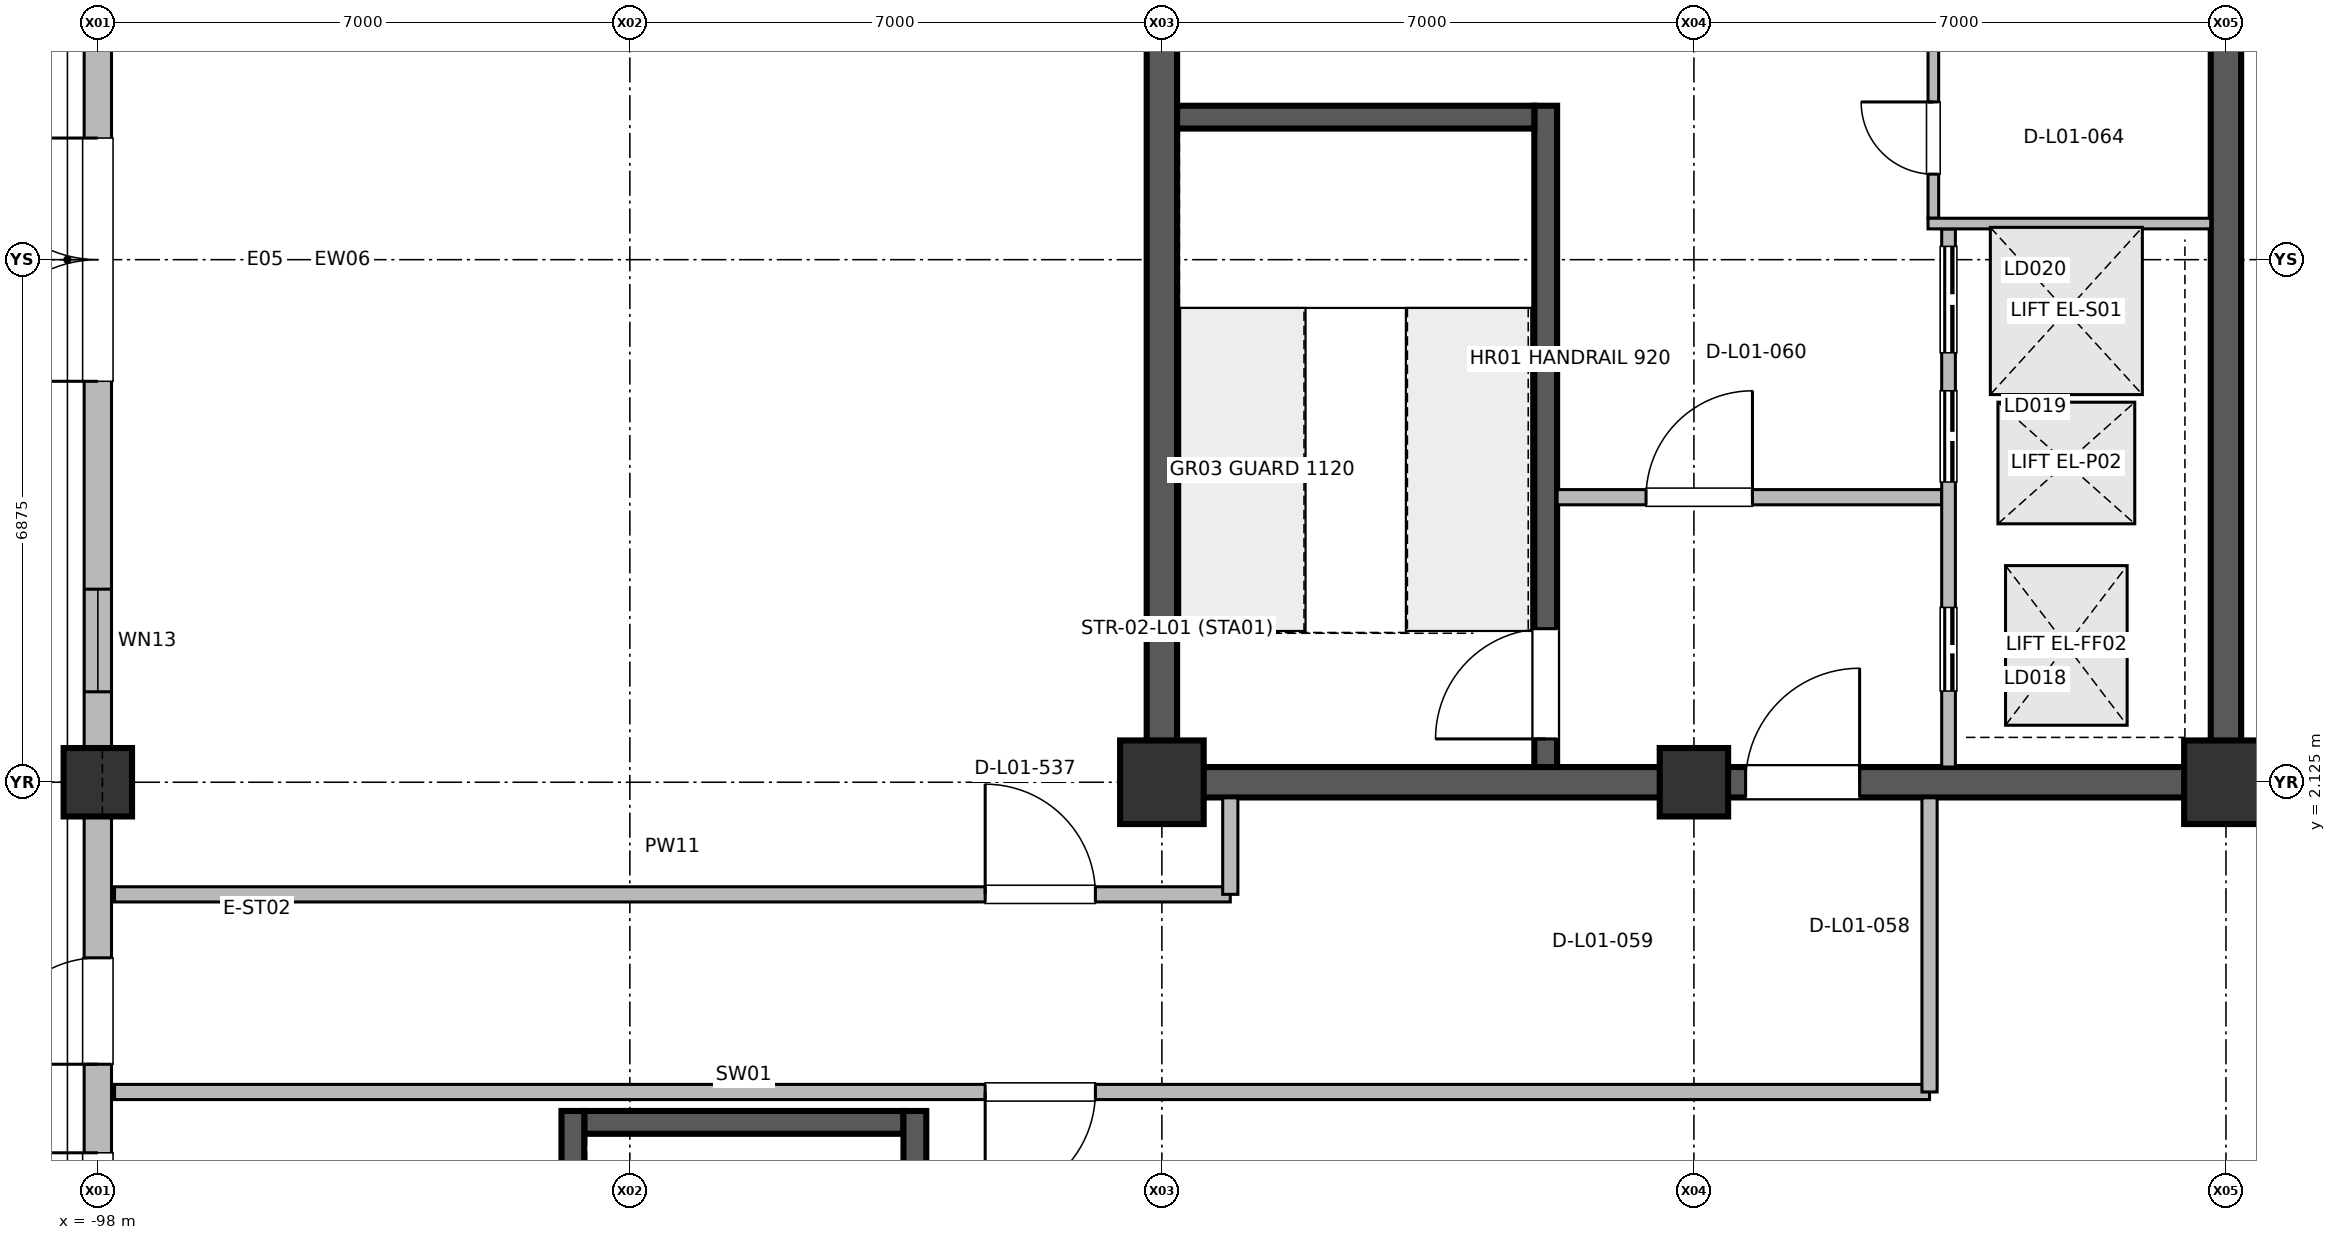
"""IFC4 building model, lengths in metres.
Left out: names, types, materials, properties, quantities, classifications, styles, units other than length and angle.
Written with IfcOpenShell. Run it as: python <this file> out.ifc"""

import sys

from ifc_helpers import new_model, si_unit, direction, frame, frame_2d, origin, origin_2d, place, context, subcontext, project, spatial, rectangle, extrude, element, fill, save


model = new_model("IFC4")
c1 = context("Model", 3, precision=1e-05, world=origin(), true_north=direction((0.0, 1.0)))
c2 = subcontext(c1, "Body", "Model", "MODEL_VIEW")
j1 = project(units=[si_unit("LENGTHUNIT", "METRE"), si_unit("PLANEANGLEUNIT", "RADIAN")], contexts=[c1])
p1 = place(None, origin())
s1 = spatial("IfcSite", under=j1, at=p1, CompositionType="ELEMENT")
p2 = place(p1, origin())
s2 = spatial("IfcBuilding", under=s1, at=p2, CompositionType="ELEMENT")
p3 = place(p2, origin())
s3 = spatial("IfcBuildingStorey", under=s2, at=p3, CompositionType="ELEMENT", Elevation=0.0)
p4 = place(p3, frame((-98.0, 2.125, 0.0), z_axis=(0.0, 0.0, 1.0), x_axis=(1.0, 0.0, 0.0)))
e1 = element("IfcColumn", 1, at=p4, inside=s3, PredefinedType="COLUMN", context=c2, shape_type="SweptSolid", body=[
    extrude(rectangle(XDim=0.9, YDim=0.9, at=origin_2d()), origin(), (0.0, 0.0, 1.0), 5.998),
])
p5 = place(p3, frame((-84.0, 2.125, 0.0), z_axis=(0.0, 0.0, 1.0), x_axis=(1.0, 0.0, 0.0)))
e2 = element("IfcColumn", 2, at=p5, inside=s3, PredefinedType="COLUMN", context=c2, shape_type="SweptSolid", body=[
    extrude(rectangle(XDim=1.1, YDim=1.1, at=origin_2d()), origin(), (0.0, 0.0, 1.0), 5.998),
])
p6 = place(p3, frame((-77.0, 2.125, 0.0), z_axis=(0.0, 0.0, 1.0), x_axis=(1.0, 0.0, 0.0)))
e3 = element("IfcColumn", 3, at=p6, inside=s3, PredefinedType="COLUMN", context=c2, shape_type="SweptSolid", body=[
    extrude(rectangle(XDim=0.9, YDim=0.9, at=origin_2d()), origin(), (0.0, 0.0, 1.0), 5.998),
])
p7 = place(p3, frame((-70.0, 2.125, 0.0), z_axis=(0.0, 0.0, 1.0), x_axis=(1.0, 0.0, 0.0)))
e4 = element("IfcColumn", 4, at=p7, inside=s3, PredefinedType="COLUMN", context=c2, shape_type="SweptSolid", body=[
    extrude(rectangle(XDim=1.1, YDim=1.1, at=origin_2d()), origin(), (0.0, 0.0, 1.0), 5.998),
])
for number, where, z_axis, x_axis in (
    (5, (-84.0, 2.325, 0.0), (0.0, 0.0, 1.0), (0.0, 1.0, 0.0)),
    (6, (-70.0, 2.325, 0.0), (0.0, 0.0, 1.0), (0.0, 1.0, 0.0)),
):
    element("IfcWall", number, at=place(p3, frame(where, z_axis=z_axis, x_axis=x_axis)), inside=s3, PredefinedType="SHEAR", context=c2, shape_type="SweptSolid", body=[
        extrude(rectangle(XDim=13.35, YDim=0.4, at=frame_2d((6.675, 0.0))), origin(), (0.0, 0.0, 1.0), 5.78),
    ])
p8 = place(p3, frame((-83.8, 2.125, 0.0), z_axis=(0.0, 0.0, 1.0), x_axis=(1.0, 0.0, 0.0)))
e7 = element("IfcWall", 7, at=p8, inside=s3, PredefinedType="SHEAR", context=c2, shape_type="SweptSolid", body=[
    extrude(rectangle(XDim=13.6, YDim=0.4, at=frame_2d((6.8, 0.0))), origin(), (0.0, 0.0, 1.0), 5.78),
])
p9 = place(p8, frame((7.48, 0.0, 0.0)))
e8 = element("IfcOpeningElement", 8, at=p9, cuts=e7, PredefinedType="OPENING", context=c2, shape_type="SweptSolid", body=[
    extrude(rectangle(XDim=1.5, YDim=2.2, at=frame_2d((0.75, 1.1))), frame((0.0, 0.21, 0.0), z_axis=(0.0, -1.0, 0.0), x_axis=(1.0, 0.0, 0.0)), (0.0, 0.0, 1.0), 0.42),
])
p10 = place(p3, frame((-98.0, -11.185, 0.0), z_axis=(0.0, 0.0, 1.0), x_axis=(0.0, 1.0, 0.0)))
e9 = element("IfcWall", 9, at=p10, inside=s3, PredefinedType="SOLIDWALL", context=c2, shape_type="SweptSolid", body=[
    extrude(rectangle(XDim=12.87, YDim=0.36, at=frame_2d((6.435, 0.0))), origin(), (0.0, 0.0, 1.0), 4.655),
])
p11 = place(p10, frame((4.435, 0.0, 0.0)))
e10 = element("IfcOpeningElement", 10, at=p11, cuts=e9, PredefinedType="OPENING", context=c2, shape_type="SweptSolid", body=[
    extrude(rectangle(XDim=4.0, YDim=2.8, at=frame_2d((2.0, 1.4))), frame((0.0, 0.19, 0.0), z_axis=(0.0, -1.0, 0.0), x_axis=(1.0, 0.0, 0.0)), (0.0, 0.0, 1.0), 0.38),
])
p12 = place(p10, frame((0.75, 0.0, 1.0)))
e11 = element("IfcOpeningElement", 11, at=p12, cuts=e9, PredefinedType="OPENING", context=c2, shape_type="SweptSolid", body=[
    extrude(rectangle(XDim=2.7, YDim=2.1, at=frame_2d((1.35, 1.05))), frame((0.0, 0.19, 0.0), z_axis=(0.0, -1.0, 0.0), x_axis=(1.0, 0.0, 0.0)), (0.0, 0.0, 1.0), 0.38),
])
p13 = place(p10, frame((9.6, 0.0, 0.0)))
e12 = element("IfcOpeningElement", 12, at=p13, cuts=e9, PredefinedType="OPENING", context=c2, shape_type="SweptSolid", body=[
    extrude(rectangle(XDim=1.4, YDim=2.2, at=frame_2d((0.7, 1.1))), frame((0.0, 0.19, 0.0), z_axis=(0.0, -1.0, 0.0), x_axis=(1.0, 0.0, 0.0)), (0.0, 0.0, 1.0), 0.38),
])
p14 = place(p3, frame((-98.0, 2.565, 0.0), z_axis=(0.0, 0.0, 1.0), x_axis=(0.0, 1.0, 0.0)))
e13 = element("IfcWall", 13, at=p14, inside=s3, PredefinedType="SOLIDWALL", context=c2, shape_type="SweptSolid", body=[
    extrude(rectangle(XDim=12.87, YDim=0.36, at=frame_2d((6.435, 0.0))), origin(), (0.0, 0.0, 1.0), 4.655),
])
p15 = place(p14, frame((4.835, 0.0, 0.0)))
e14 = element("IfcOpeningElement", 14, at=p15, cuts=e13, PredefinedType="OPENING", context=c2, shape_type="SweptSolid", body=[
    extrude(rectangle(XDim=3.2, YDim=2.7, at=frame_2d((1.6, 1.35))), frame((0.0, 0.19, 0.0), z_axis=(0.0, -1.0, 0.0), x_axis=(1.0, 0.0, 0.0)), (0.0, 0.0, 1.0), 0.38),
])
p16 = place(p14, frame((0.75, 0.0, 1.0)))
e15 = element("IfcOpeningElement", 15, at=p16, cuts=e13, PredefinedType="OPENING", context=c2, shape_type="SweptSolid", body=[
    extrude(rectangle(XDim=1.35, YDim=1.75, at=frame_2d((0.675, 0.875))), frame((0.0, 0.19, 0.0), z_axis=(0.0, -1.0, 0.0), x_axis=(1.0, 0.0, 0.0)), (0.0, 0.0, 1.0), 0.38),
])
p17 = place(p14, frame((10.77, 0.0, 1.0)))
e16 = element("IfcOpeningElement", 16, at=p17, cuts=e13, PredefinedType="OPENING", context=c2, shape_type="SweptSolid", body=[
    extrude(rectangle(XDim=1.35, YDim=1.75, at=frame_2d((0.675, 0.875))), frame((0.0, 0.19, 0.0), z_axis=(0.0, -1.0, 0.0), x_axis=(1.0, 0.0, 0.0)), (0.0, 0.0, 1.0), 0.38),
])
p18 = place(p3, frame((-78.95, 2.325, 0.0), z_axis=(0.0, 0.0, 1.0), x_axis=(0.0, 1.0, 0.0)))
e17 = element("IfcWall", 17, at=p18, inside=s3, PredefinedType="SHEAR", context=c2, shape_type="SweptSolid", body=[
    extrude(rectangle(XDim=8.7, YDim=0.3, at=frame_2d((4.35, 0.0))), origin(), (0.0, 0.0, 1.0), 5.78),
])
p19 = place(p18, frame((0.37, 0.0, 0.0)))
e18 = element("IfcOpeningElement", 18, at=p19, cuts=e17, PredefinedType="OPENING", context=c2, shape_type="SweptSolid", body=[
    extrude(rectangle(XDim=1.45, YDim=2.2, at=frame_2d((0.725, 1.1))), frame((0.0, 0.16, 0.0), z_axis=(0.0, -1.0, 0.0), x_axis=(1.0, 0.0, 0.0)), (0.0, 0.0, 1.0), 0.32),
])
p20 = place(p3, frame((-78.8, 5.875, 0.0), z_axis=(0.0, 0.0, 1.0), x_axis=(1.0, 0.0, 0.0)))
e19 = element("IfcWall", 19, at=p20, inside=s3, PredefinedType="PARTITIONING", context=c2, shape_type="SweptSolid", body=[
    extrude(rectangle(XDim=5.06, YDim=0.2, at=frame_2d((2.53, 0.0))), origin(), (0.0, 0.0, 1.0), 4.555),
])
p21 = place(p20, frame((1.17, 0.0, 0.0)))
e20 = element("IfcOpeningElement", 20, at=p21, cuts=e19, PredefinedType="OPENING", context=c2, shape_type="SweptSolid", body=[
    extrude(rectangle(XDim=1.4, YDim=2.2, at=frame_2d((0.7, 1.1))), frame((0.0, 0.11, 0.0), z_axis=(0.0, -1.0, 0.0), x_axis=(1.0, 0.0, 0.0)), (0.0, 0.0, 1.0), 0.22),
])
p22 = place(p3, frame((-73.65, 2.325, 0.0), z_axis=(0.0, 0.0, 1.0), x_axis=(0.0, 1.0, 0.0)))
e21 = element("IfcWall", 21, at=p22, inside=s3, PredefinedType="PARTITIONING", context=c2, shape_type="SweptSolid", body=[
    extrude(rectangle(XDim=7.08, YDim=0.18, at=frame_2d((3.54, 0.0))), origin(), (0.0, 0.0, 1.0), 5.02),
])
p23 = place(p22, frame((1.0, 0.0, 0.0)))
e22 = element("IfcOpeningElement", 22, at=p23, cuts=e21, PredefinedType="OPENING", context=c2, shape_type="SweptSolid", body=[
    extrude(rectangle(XDim=1.1, YDim=2.2, at=frame_2d((0.55, 1.1))), frame((0.0, 0.1, 0.0), z_axis=(0.0, -1.0, 0.0), x_axis=(1.0, 0.0, 0.0)), (0.0, 0.0, 1.0), 0.2),
])
p24 = place(p22, frame((3.75, 0.0, 0.0)))
e23 = element("IfcOpeningElement", 23, at=p24, cuts=e21, PredefinedType="OPENING", context=c2, shape_type="SweptSolid", body=[
    extrude(rectangle(XDim=1.2, YDim=2.25, at=frame_2d((0.6, 1.125))), frame((0.0, 0.1, 0.0), z_axis=(0.0, -1.0, 0.0), x_axis=(1.0, 0.0, 0.0)), (0.0, 0.0, 1.0), 0.2),
])
p25 = place(p22, frame((5.45, 0.0, 0.0)))
e24 = element("IfcOpeningElement", 24, at=p25, cuts=e21, PredefinedType="OPENING", context=c2, shape_type="SweptSolid", body=[
    extrude(rectangle(XDim=1.4, YDim=2.3, at=frame_2d((0.7, 1.15))), frame((0.0, 0.1, 0.0), z_axis=(0.0, -1.0, 0.0), x_axis=(1.0, 0.0, 0.0)), (0.0, 0.0, 1.0), 0.2),
])
p26 = place(p3, frame((-73.85, 9.545, 0.0), z_axis=(0.0, 0.0, 1.0), x_axis=(0.0, 1.0, 0.0)))
e25 = element("IfcWall", 25, at=p26, inside=s3, PredefinedType="PARTITIONING", context=c2, shape_type="SweptSolid", body=[
    extrude(rectangle(XDim=6.13, YDim=0.14, at=frame_2d((3.065, 0.0))), origin(), (0.0, 0.0, 1.0), 5.02),
])
p27 = place(p26, frame((0.58, 0.0, 0.0)))
e26 = element("IfcOpeningElement", 26, at=p27, cuts=e25, PredefinedType="OPENING", context=c2, shape_type="SweptSolid", body=[
    extrude(rectangle(XDim=0.95, YDim=2.15, at=frame_2d((0.475, 1.075))), frame((0.0, 0.08, 0.0), z_axis=(0.0, -1.0, 0.0), x_axis=(1.0, 0.0, 0.0)), (0.0, 0.0, 1.0), 0.16),
])
p28 = place(p26, frame((3.08, 0.0, 0.0)))
e27 = element("IfcOpeningElement", 27, at=p28, cuts=e25, PredefinedType="OPENING", context=c2, shape_type="SweptSolid", body=[
    extrude(rectangle(XDim=1.1, YDim=2.15, at=frame_2d((0.55, 1.075))), frame((0.0, 0.08, 0.0), z_axis=(0.0, -1.0, 0.0), x_axis=(1.0, 0.0, 0.0)), (0.0, 0.0, 1.0), 0.16),
])
p29 = place(p3, frame((-73.9, -1.95, 0.0), z_axis=(0.0, 0.0, 1.0), x_axis=(-1.0, 0.0, 0.0)))
e28 = element("IfcWall", 28, at=p29, inside=s3, PredefinedType="PARTITIONING", context=c2, shape_type="SweptSolid", body=[
    extrude(rectangle(XDim=23.88, YDim=0.2, at=frame_2d((11.94, 0.0))), origin(), (0.0, 0.0, 1.0), 5.02),
])
p30 = place(p29, frame((10.975, 0.0, 0.0)))
e29 = element("IfcOpeningElement", 29, at=p30, cuts=e28, PredefinedType="OPENING", context=c2, shape_type="SweptSolid", body=[
    extrude(rectangle(XDim=1.45, YDim=2.2, at=frame_2d((0.725, 1.1))), frame((0.0, 0.11, 0.0), z_axis=(0.0, -1.0, 0.0), x_axis=(1.0, 0.0, 0.0)), (0.0, 0.0, 1.0), 0.22),
])
p31 = place(p3, frame((-97.78, 0.65, 0.0), z_axis=(0.0, 0.0, 1.0), x_axis=(1.0, 0.0, 0.0)))
e30 = element("IfcWall", 30, at=p31, inside=s3, PredefinedType="PARTITIONING", context=c2, shape_type="SweptSolid", body=[
    extrude(rectangle(XDim=14.68, YDim=0.2, at=frame_2d((7.34, 0.0))), origin(), (0.0, 0.0, 1.0), 5.02),
])
p32 = place(p31, frame((11.455, 0.0, 0.0)))
e31 = element("IfcOpeningElement", 31, at=p32, cuts=e30, PredefinedType="OPENING", context=c2, shape_type="SweptSolid", body=[
    extrude(rectangle(XDim=1.45, YDim=2.2, at=frame_2d((0.725, 1.1))), frame((0.0, 0.11, 0.0), z_axis=(0.0, -1.0, 0.0), x_axis=(1.0, 0.0, 0.0)), (0.0, 0.0, 1.0), 0.22),
])
p33 = place(p3, frame((-83.1, 0.65, 0.0), z_axis=(0.0, 0.0, 1.0), x_axis=(0.0, 1.0, 0.0)))
e32 = element("IfcWall", 32, at=p33, inside=s3, PredefinedType="PARTITIONING", context=c2, shape_type="SweptSolid", body=[
    extrude(rectangle(XDim=1.27, YDim=0.2, at=frame_2d((0.635, 0.0))), origin(), (0.0, 0.0, 1.0), 5.02),
])
p34 = place(p3, frame((-73.9, -1.95, 0.0), z_axis=(0.0, 0.0, 1.0), x_axis=(0.0, 1.0, 0.0)))
e33 = element("IfcWall", 33, at=p34, inside=s3, PredefinedType="PARTITIONING", context=c2, shape_type="SweptSolid", body=[
    extrude(rectangle(XDim=3.87, YDim=0.2, at=frame_2d((1.935, 0.0))), origin(), (0.0, 0.0, 1.0), 5.02),
])
p35 = place(p3, frame((-73.92, 9.475, 0.0), z_axis=(0.0, 0.0, 1.0), x_axis=(1.0, 0.0, 0.0)))
e34 = element("IfcWall", 34, at=p35, inside=s3, PredefinedType="PARTITIONING", context=c2, shape_type="SweptSolid", body=[
    extrude(rectangle(XDim=3.72, YDim=0.14, at=frame_2d((1.86, 0.0))), origin(), (0.0, 0.0, 1.0), 5.02),
])
p36 = place(p3, frame((-83.8, 10.875, 0.0), z_axis=(0.0, 0.0, 1.0), x_axis=(1.0, 0.0, 0.0)))
e35 = element("IfcWall", 35, at=p36, inside=s3, PredefinedType="SHEAR", context=c2, shape_type="SweptSolid", body=[
    extrude(rectangle(XDim=4.7, YDim=0.3, at=frame_2d((2.35, 0.0))), origin(), (0.0, 0.0, 1.0), 5.78),
])
p37 = place(p3, frame((-91.6, -2.35, 0.0), z_axis=(0.0, 0.0, 1.0), x_axis=(1.0, 0.0, 0.0)))
e36 = element("IfcWall", 36, at=p37, inside=s3, PredefinedType="SHEAR", context=c2, shape_type="SweptSolid", body=[
    extrude(rectangle(XDim=4.2, YDim=0.3, at=frame_2d((2.1, 0.0))), origin(), (0.0, 0.0, 1.0), 5.78),
])
for number, where, z_axis, x_axis in (
    (37, (-91.75, -10.65, 0.0), (0.0, 0.0, 1.0), (0.0, 1.0, 0.0)),
    (38, (-87.25, -10.65, 0.0), (0.0, 0.0, 1.0), (0.0, 1.0, 0.0)),
):
    element("IfcWall", number, at=place(p3, frame(where, z_axis=z_axis, x_axis=x_axis)), inside=s3, PredefinedType="SHEAR", context=c2, shape_type="SweptSolid", body=[
        extrude(rectangle(XDim=8.45, YDim=0.3, at=frame_2d((4.225, 0.0))), origin(), (0.0, 0.0, 1.0), 5.78),
    ])
p38 = place(p11, origin())
e39 = element("IfcDoor", 39, at=p38, inside=s3, OperationType="DOUBLE_DOOR_SINGLE_SWING", PredefinedType="DOOR", context=c2, shape_type="SweptSolid", body=[
    extrude(rectangle(XDim=4.0, YDim=2.8, at=frame_2d((2.0, 1.4))), frame((0.0, 0.025, 0.0), z_axis=(0.0, -1.0, 0.0), x_axis=(1.0, 0.0, 0.0)), (0.0, 0.0, 1.0), 0.05),
])
fill(e10, e39)
p39 = place(p13, origin())
e40 = element("IfcDoor", 40, at=p39, inside=s3, OperationType="SINGLE_SWING_LEFT", PredefinedType="DOOR", context=c2, shape_type="SweptSolid", body=[
    extrude(rectangle(XDim=1.4, YDim=2.2, at=frame_2d((0.7, 1.1))), frame((0.0, 0.025, 0.0), z_axis=(0.0, -1.0, 0.0), x_axis=(1.0, 0.0, 0.0)), (0.0, 0.0, 1.0), 0.05),
])
fill(e12, e40)
p40 = place(p15, origin())
e41 = element("IfcDoor", 41, at=p40, inside=s3, OperationType="DOUBLE_DOOR_SINGLE_SWING", PredefinedType="DOOR", context=c2, shape_type="SweptSolid", body=[
    extrude(rectangle(XDim=3.2, YDim=2.7, at=frame_2d((1.6, 1.35))), frame((0.0, 0.025, 0.0), z_axis=(0.0, -1.0, 0.0), x_axis=(1.0, 0.0, 0.0)), (0.0, 0.0, 1.0), 0.05),
])
fill(e14, e41)
p41 = place(p16, origin())
e42 = element("IfcWindow", 42, at=p41, inside=s3, PartitioningType="SINGLE_PANEL", PredefinedType="WINDOW", context=c2, shape_type="SweptSolid", body=[
    extrude(rectangle(XDim=1.35, YDim=1.75, at=frame_2d((0.675, 0.875))), frame((0.0, 0.03, 0.0), z_axis=(0.0, -1.0, 0.0), x_axis=(1.0, 0.0, 0.0)), (0.0, 0.0, 1.0), 0.06),
])
fill(e15, e42)
p42 = place(p9, origin())
e43 = element("IfcDoor", 43, at=p42, inside=s3, OperationType="SINGLE_SWING_RIGHT", PredefinedType="DOOR", context=c2, shape_type="SweptSolid", body=[
    extrude(rectangle(XDim=1.5, YDim=2.2, at=frame_2d((0.75, 1.1))), frame((0.0, 0.025, 0.0), z_axis=(0.0, -1.0, 0.0), x_axis=(1.0, 0.0, 0.0)), (0.0, 0.0, 1.0), 0.05),
])
fill(e8, e43)
p43 = place(p19, origin())
e44 = element("IfcDoor", 44, at=p43, inside=s3, OperationType="SINGLE_SWING_LEFT", PredefinedType="DOOR", context=c2, shape_type="SweptSolid", body=[
    extrude(rectangle(XDim=1.45, YDim=2.2, at=frame_2d((0.725, 1.1))), frame((0.0, 0.025, 0.0), z_axis=(0.0, -1.0, 0.0), x_axis=(1.0, 0.0, 0.0)), (0.0, 0.0, 1.0), 0.05),
])
fill(e18, e44)
p44 = place(p21, origin())
e45 = element("IfcDoor", 45, at=p44, inside=s3, OperationType="SINGLE_SWING_RIGHT", PredefinedType="DOOR", context=c2, shape_type="SweptSolid", body=[
    extrude(rectangle(XDim=1.4, YDim=2.2, at=frame_2d((0.7, 1.1))), frame((0.0, 0.025, 0.0), z_axis=(0.0, -1.0, 0.0), x_axis=(1.0, 0.0, 0.0)), (0.0, 0.0, 1.0), 0.05),
])
fill(e20, e45)
p45 = place(p23, origin())
e46 = element("IfcDoor", 46, at=p45, inside=s3, OperationType="DOUBLE_DOOR_SLIDING", PredefinedType="DOOR", context=c2, shape_type="SweptSolid", body=[
    extrude(rectangle(XDim=1.1, YDim=2.2, at=frame_2d((0.55, 1.1))), frame((0.0, 0.025, 0.0), z_axis=(0.0, -1.0, 0.0), x_axis=(1.0, 0.0, 0.0)), (0.0, 0.0, 1.0), 0.05),
])
fill(e22, e46)
p46 = place(p24, origin())
e47 = element("IfcDoor", 47, at=p46, inside=s3, OperationType="DOUBLE_DOOR_SLIDING", PredefinedType="DOOR", context=c2, shape_type="SweptSolid", body=[
    extrude(rectangle(XDim=1.2, YDim=2.25, at=frame_2d((0.6, 1.125))), frame((0.0, 0.025, 0.0), z_axis=(0.0, -1.0, 0.0), x_axis=(1.0, 0.0, 0.0)), (0.0, 0.0, 1.0), 0.05),
])
fill(e23, e47)
p47 = place(p25, origin())
e48 = element("IfcDoor", 48, at=p47, inside=s3, OperationType="DOUBLE_DOOR_SLIDING", PredefinedType="DOOR", context=c2, shape_type="SweptSolid", body=[
    extrude(rectangle(XDim=1.4, YDim=2.3, at=frame_2d((0.7, 1.15))), frame((0.0, 0.025, 0.0), z_axis=(0.0, -1.0, 0.0), x_axis=(1.0, 0.0, 0.0)), (0.0, 0.0, 1.0), 0.05),
])
fill(e24, e48)
p48 = place(p27, origin())
e49 = element("IfcDoor", 49, at=p48, inside=s3, OperationType="SINGLE_SWING_RIGHT", PredefinedType="DOOR", context=c2, shape_type="SweptSolid", body=[
    extrude(rectangle(XDim=0.95, YDim=2.15, at=frame_2d((0.475, 1.075))), frame((0.0, 0.025, 0.0), z_axis=(0.0, -1.0, 0.0), x_axis=(1.0, 0.0, 0.0)), (0.0, 0.0, 1.0), 0.05),
])
fill(e26, e49)
p49 = place(p30, origin())
e50 = element("IfcDoor", 50, at=p49, inside=s3, OperationType="SINGLE_SWING_RIGHT", PredefinedType="DOOR", context=c2, shape_type="SweptSolid", body=[
    extrude(rectangle(XDim=1.45, YDim=2.2, at=frame_2d((0.725, 1.1))), frame((0.0, 0.025, 0.0), z_axis=(0.0, -1.0, 0.0), x_axis=(1.0, 0.0, 0.0)), (0.0, 0.0, 1.0), 0.05),
])
fill(e29, e50)
p50 = place(p32, origin())
e51 = element("IfcDoor", 51, at=p50, inside=s3, OperationType="SINGLE_SWING_LEFT", PredefinedType="DOOR", context=c2, shape_type="SweptSolid", body=[
    extrude(rectangle(XDim=1.45, YDim=2.2, at=frame_2d((0.725, 1.1))), frame((0.0, 0.025, 0.0), z_axis=(0.0, -1.0, 0.0), x_axis=(1.0, 0.0, 0.0)), (0.0, 0.0, 1.0), 0.05),
])
fill(e31, e51)
save(model, sys.argv[1])
